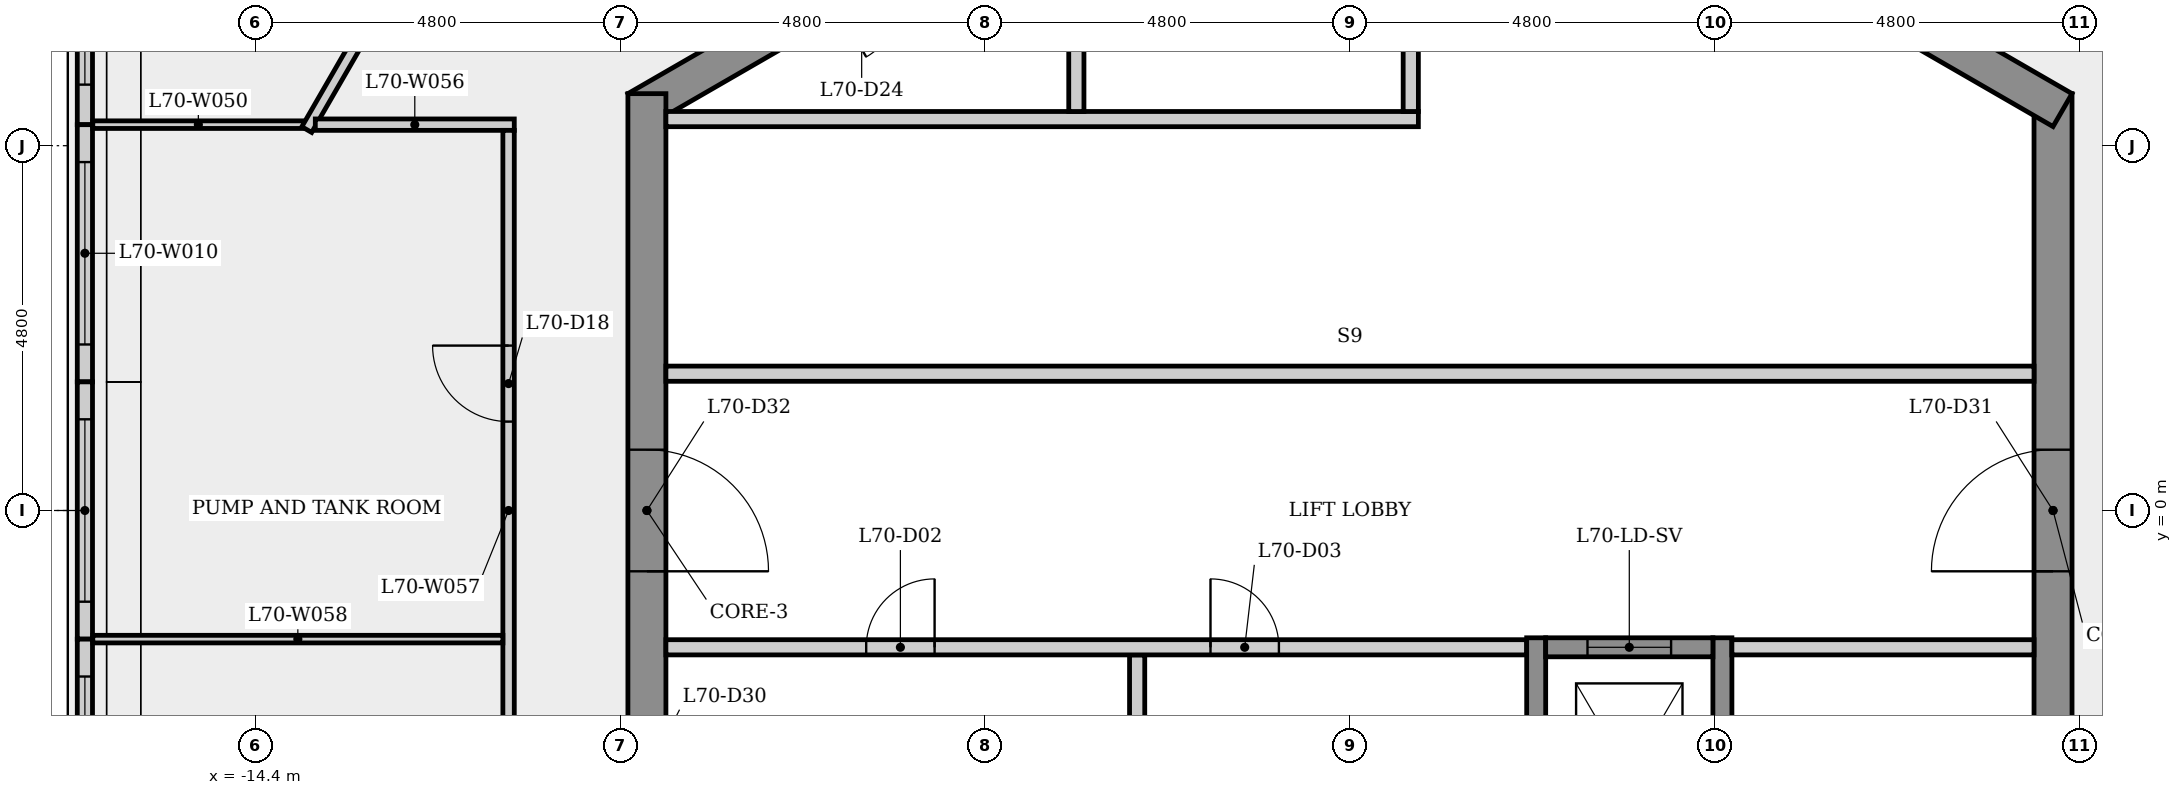
"""IFC4 building model, lengths in metres.
Left out: names, types, materials, properties, quantities, classifications, styles, units other than length and angle.
Written with IfcOpenShell. Run it as: python <this file> out.ifc"""

import sys

from ifc_helpers import new_model, si_unit, direction, frame, frame_2d, origin, place, context, subcontext, project, spatial, rectangle, extrude, element, fill, save


model = new_model("IFC4")
c1 = context("Model", 3, precision=1e-05, world=origin(), true_north=direction((0.0, 1.0)))
c2 = subcontext(c1, "Body", "Model", "MODEL_VIEW")
j1 = project(units=[si_unit("LENGTHUNIT", "METRE"), si_unit("PLANEANGLEUNIT", "RADIAN")], contexts=[c1])
p1 = place(None, origin())
s1 = spatial("IfcSite", under=j1, at=p1, CompositionType="ELEMENT")
p2 = place(p1, origin())
s2 = spatial("IfcBuilding", under=s1, at=p2, CompositionType="ELEMENT")
p3 = place(p2, frame((0.0, 0.0, 262.9)))
s3 = spatial("IfcBuildingStorey", under=s2, at=p3, CompositionType="ELEMENT", Elevation=262.9)
p4 = place(p3, frame((9.25, -5.485, 0.0), z_axis=(0.0, 0.0, 1.0), x_axis=(0.0, 1.0, 0.0)))
e1 = element("IfcWall", 1, at=p4, inside=s3, PredefinedType="SHEAR", context=c2, shape_type="SweptSolid", body=[
    extrude(rectangle(XDim=10.97, YDim=0.5, at=frame_2d((5.485, 0.0))), origin(), (0.0, 0.0, 1.0), 4.8),
])
p5 = place(p4, frame((4.685, 0.0, 0.0)))
e2 = element("IfcOpeningElement", 2, at=p5, cuts=e1, PredefinedType="OPENING", context=c2, shape_type="SweptSolid", body=[
    extrude(rectangle(XDim=1.6, YDim=2.1, at=frame_2d((0.8, 1.05))), frame((0.0, 0.26, 0.0), z_axis=(0.0, -1.0, 0.0), x_axis=(1.0, 0.0, 0.0)), (0.0, 0.0, 1.0), 0.52),
])
p6 = place(p3, frame((9.375, 5.268, 0.0), z_axis=(0.0, 0.0, 1.0), x_axis=(-0.866023993627, 0.500002442456, 0.0)))
e3 = element("IfcWall", 3, at=p6, inside=s3, PredefinedType="SHEAR", context=c2, shape_type="SweptSolid", body=[
    extrude(rectangle(XDim=10.97, YDim=0.5, at=frame_2d((5.485, 0.0))), origin(), (0.0, 0.0, 1.0), 4.8),
])
p7 = place(p6, frame((4.55, 0.0, 0.0)))
e4 = element("IfcOpeningElement", 4, at=p7, cuts=e3, PredefinedType="OPENING", context=c2, shape_type="SweptSolid", body=[
    extrude(rectangle(XDim=0.9, YDim=2.1, at=frame_2d((0.45, 1.05))), frame((0.0, 0.26, 0.0), z_axis=(0.0, -1.0, 0.0), x_axis=(1.0, 0.0, 0.0)), (0.0, 0.0, 1.0), 0.52),
])
p8 = place(p3, frame((0.125, 10.753, 0.0), z_axis=(0.0, 0.0, 1.0), x_axis=(-0.866023993627, -0.500002442456, 0.0)))
e5 = element("IfcWall", 5, at=p8, inside=s3, PredefinedType="SHEAR", context=c2, shape_type="SweptSolid", body=[
    extrude(rectangle(XDim=10.97, YDim=0.5, at=frame_2d((5.485, 0.0))), origin(), (0.0, 0.0, 1.0), 4.8),
])
p9 = place(p8, frame((7.113, 0.0, 0.0)))
e6 = element("IfcOpeningElement", 6, at=p9, cuts=e5, PredefinedType="OPENING", context=c2, shape_type="SweptSolid", body=[
    extrude(rectangle(XDim=0.9, YDim=2.1, at=frame_2d((0.45, 1.05))), frame((0.0, 0.26, 0.0), z_axis=(0.0, -1.0, 0.0), x_axis=(1.0, 0.0, 0.0)), (0.0, 0.0, 1.0), 0.52),
])
p10 = place(p8, frame((1.918, 0.0, 0.0)))
e7 = element("IfcOpeningElement", 7, at=p10, cuts=e5, PredefinedType="OPENING", context=c2, shape_type="SweptSolid", body=[
    extrude(rectangle(XDim=0.9, YDim=2.1, at=frame_2d((0.45, 1.05))), frame((0.0, 0.26, 0.0), z_axis=(0.0, -1.0, 0.0), x_axis=(1.0, 0.0, 0.0)), (0.0, 0.0, 1.0), 0.52),
])
p11 = place(p3, frame((-9.25, 5.485, 0.0), z_axis=(0.0, 0.0, 1.0), x_axis=(0.0, -1.0, 0.0)))
e8 = element("IfcWall", 8, at=p11, inside=s3, PredefinedType="SHEAR", context=c2, shape_type="SweptSolid", body=[
    extrude(rectangle(XDim=10.97, YDim=0.5, at=frame_2d((5.485, 0.0))), origin(), (0.0, 0.0, 1.0), 4.8),
])
p12 = place(p11, frame((8.509, 0.0, 0.0)))
e9 = element("IfcOpeningElement", 9, at=p12, cuts=e8, PredefinedType="OPENING", context=c2, shape_type="SweptSolid", body=[
    extrude(rectangle(XDim=0.9, YDim=2.1, at=frame_2d((0.45, 1.05))), frame((0.0, 0.26, 0.0), z_axis=(0.0, -1.0, 0.0), x_axis=(1.0, 0.0, 0.0)), (0.0, 0.0, 1.0), 0.52),
])
p13 = place(p11, frame((4.685, 0.0, 0.0)))
e10 = element("IfcOpeningElement", 10, at=p13, cuts=e8, PredefinedType="OPENING", context=c2, shape_type="SweptSolid", body=[
    extrude(rectangle(XDim=1.6, YDim=2.1, at=frame_2d((0.8, 1.05))), frame((0.0, 0.26, 0.0), z_axis=(0.0, -1.0, 0.0), x_axis=(1.0, 0.0, 0.0)), (0.0, 0.0, 1.0), 0.52),
])
p14 = place(p3, frame((-16.645, 8.531, 0.0), z_axis=(0.0, 0.0, 1.0), x_axis=(0.0, -1.0, 0.0)))
e11 = element("IfcWall", 11, at=p14, inside=s3, PredefinedType="SOLIDWALL", context=c2, shape_type="SweptSolid", body=[
    extrude(rectangle(XDim=3.454, YDim=0.2, at=frame_2d((1.727, 0.0))), origin(), (0.0, 0.0, 1.0), 4.8),
])
p15 = place(p14, frame((0.527, 0.0, 0.8)))
e12 = element("IfcOpeningElement", 12, at=p15, cuts=e11, PredefinedType="OPENING", context=c2, shape_type="SweptSolid", body=[
    extrude(rectangle(XDim=2.4, YDim=2.4, at=frame_2d((1.2, 1.2))), frame((0.0, 0.11, 0.0), z_axis=(0.0, -1.0, 0.0), x_axis=(1.0, 0.0, 0.0)), (0.0, 0.0, 1.0), 0.22),
])
p16 = place(p3, frame((-16.645, 5.076, 0.0), z_axis=(0.0, 0.0, 1.0), x_axis=(0.0, -1.0, 0.0)))
e13 = element("IfcWall", 13, at=p16, inside=s3, PredefinedType="SOLIDWALL", context=c2, shape_type="SweptSolid", body=[
    extrude(rectangle(XDim=3.384, YDim=0.2, at=frame_2d((1.692, 0.0))), origin(), (0.0, 0.0, 1.0), 4.8),
])
p17 = place(p16, frame((0.492, 0.0, 0.8)))
e14 = element("IfcOpeningElement", 14, at=p17, cuts=e13, PredefinedType="OPENING", context=c2, shape_type="SweptSolid", body=[
    extrude(rectangle(XDim=2.4, YDim=2.4, at=frame_2d((1.2, 1.2))), frame((0.0, 0.11, 0.0), z_axis=(0.0, -1.0, 0.0), x_axis=(1.0, 0.0, 0.0)), (0.0, 0.0, 1.0), 0.22),
])
p18 = place(p3, frame((-16.645, 1.692, 0.0), z_axis=(0.0, 0.0, 1.0), x_axis=(0.0, -1.0, 0.0)))
e15 = element("IfcWall", 15, at=p18, inside=s3, PredefinedType="SOLIDWALL", context=c2, shape_type="SweptSolid", body=[
    extrude(rectangle(XDim=3.385, YDim=0.2, at=frame_2d((1.692, 0.0))), origin(), (0.0, 0.0, 1.0), 4.8),
])
p19 = place(p18, frame((0.492, 0.0, 0.8)))
e16 = element("IfcOpeningElement", 16, at=p19, cuts=e15, PredefinedType="OPENING", context=c2, shape_type="SweptSolid", body=[
    extrude(rectangle(XDim=2.4, YDim=2.4, at=frame_2d((1.2, 1.2))), frame((0.0, 0.11, 0.0), z_axis=(0.0, -1.0, 0.0), x_axis=(1.0, 0.0, 0.0)), (0.0, 0.0, 1.0), 0.22),
])
p20 = place(p3, frame((-16.645, -1.693, 0.0), z_axis=(0.0, 0.0, 1.0), x_axis=(0.0, -1.0, 0.0)))
e17 = element("IfcWall", 17, at=p20, inside=s3, PredefinedType="SOLIDWALL", context=c2, shape_type="SweptSolid", body=[
    extrude(rectangle(XDim=3.384, YDim=0.2, at=frame_2d((1.692, 0.0))), origin(), (0.0, 0.0, 1.0), 4.8),
])
p21 = place(p20, frame((0.492, 0.0, 0.8)))
e18 = element("IfcOpeningElement", 18, at=p21, cuts=e17, PredefinedType="OPENING", context=c2, shape_type="SweptSolid", body=[
    extrude(rectangle(XDim=2.4, YDim=2.4, at=frame_2d((1.2, 1.2))), frame((0.0, 0.11, 0.0), z_axis=(0.0, -1.0, 0.0), x_axis=(1.0, 0.0, 0.0)), (0.0, 0.0, 1.0), 0.22),
])
p22 = place(p3, frame((-16.541, 5.077, 0.0), z_axis=(0.0, 0.0, 1.0), x_axis=(1.0, 0.0, 0.0)))
e19 = element("IfcWall", 19, at=p22, inside=s3, PredefinedType="PARTITIONING", context=c2, shape_type="SweptSolid", body=[
    extrude(rectangle(XDim=2.778, YDim=0.1, at=frame_2d((1.389, 0.0))), origin(), (0.0, 0.0, 1.0), 4.5),
])
p23 = place(p3, frame((-13.725, 5.012, 0.0), z_axis=(0.0, 0.0, 1.0), x_axis=(0.500016458012, 0.866015901539, 0.0)))
e20 = element("IfcWall", 20, at=p23, inside=s3, PredefinedType="PARTITIONING", context=c2, shape_type="SweptSolid", body=[
    extrude(rectangle(XDim=5.966, YDim=0.15, at=frame_2d((2.983, 0.0))), origin(), (0.0, 0.0, 1.0), 4.5),
])
p24 = place(p23, frame((2.483, 0.0, 0.0)))
e21 = element("IfcOpeningElement", 21, at=p24, cuts=e20, PredefinedType="OPENING", context=c2, shape_type="SweptSolid", body=[
    extrude(rectangle(XDim=1.0, YDim=2.1, at=frame_2d((0.5, 1.05))), frame((0.0, 0.085, 0.0), z_axis=(0.0, -1.0, 0.0), x_axis=(1.0, 0.0, 0.0)), (0.0, 0.0, 1.0), 0.17),
])
p25 = place(p3, frame((-10.995, 5.077, 0.0), z_axis=(0.0, 0.0, 1.0), x_axis=(-1.0, 0.0, 0.0)))
e22 = element("IfcWall", 22, at=p25, inside=s3, PredefinedType="PARTITIONING", context=c2, shape_type="SweptSolid", body=[
    extrude(rectangle(XDim=2.618, YDim=0.15, at=frame_2d((1.309, 0.0))), origin(), (0.0, 0.0, 1.0), 4.5),
])
p26 = place(p3, frame((-11.07, -5.002, 0.0), z_axis=(0.0, 0.0, 1.0), x_axis=(0.0, 1.0, 0.0)))
e23 = element("IfcWall", 23, at=p26, inside=s3, PredefinedType="PARTITIONING", context=c2, shape_type="SweptSolid", body=[
    extrude(rectangle(XDim=10.003, YDim=0.15, at=frame_2d((5.002, 0.0))), origin(), (0.0, 0.0, 1.0), 4.5),
])
p27 = place(p26, frame((6.172, 0.0, 0.0)))
e24 = element("IfcOpeningElement", 24, at=p27, cuts=e23, PredefinedType="OPENING", context=c2, shape_type="SweptSolid", body=[
    extrude(rectangle(XDim=1.0, YDim=2.1, at=frame_2d((0.5, 1.05))), frame((0.0, 0.085, 0.0), z_axis=(0.0, -1.0, 0.0), x_axis=(1.0, 0.0, 0.0)), (0.0, 0.0, 1.0), 0.17),
])
p28 = place(p3, frame((-11.145, -1.692, 0.0), z_axis=(0.0, 0.0, 1.0), x_axis=(-1.0, 0.0, 0.0)))
e25 = element("IfcWall", 25, at=p28, inside=s3, PredefinedType="PARTITIONING", context=c2, shape_type="SweptSolid", body=[
    extrude(rectangle(XDim=5.396, YDim=0.1, at=frame_2d((2.698, 0.0))), origin(), (0.0, 0.0, 1.0), 4.5),
])
p29 = place(p3, frame((-9.0, 1.8, 0.0), z_axis=(0.0, 0.0, 1.0), x_axis=(1.0, 0.0, 0.0)))
e26 = element("IfcWall", 26, at=p29, inside=s3, PredefinedType="PARTITIONING", context=c2, shape_type="SweptSolid", body=[
    extrude(rectangle(XDim=18.0, YDim=0.2, at=frame_2d((9.0, 0.0))), origin(), (0.0, 0.0, 1.0), 4.5),
])
p30 = place(p3, frame((-9.0, 5.15, 0.0), z_axis=(0.0, 0.0, 1.0), x_axis=(1.0, 0.0, 0.0)))
e27 = element("IfcWall", 27, at=p30, inside=s3, PredefinedType="PARTITIONING", context=c2, shape_type="SweptSolid", body=[
    extrude(rectangle(XDim=9.9, YDim=0.2, at=frame_2d((4.95, 0.0))), origin(), (0.0, 0.0, 1.0), 4.5),
])
p31 = place(p3, frame((-3.6, 8.314, 0.0), z_axis=(0.0, 0.0, 1.0), x_axis=(0.0, -1.0, 0.0)))
e28 = element("IfcWall", 28, at=p31, inside=s3, PredefinedType="PARTITIONING", context=c2, shape_type="SweptSolid", body=[
    extrude(rectangle(XDim=3.064, YDim=0.2, at=frame_2d((1.532, 0.0))), origin(), (0.0, 0.0, 1.0), 4.5),
])
p32 = place(p3, frame((-2.8, -1.9, 0.0), z_axis=(0.0, 0.0, 1.0), x_axis=(0.0, -1.0, 0.0)))
e29 = element("IfcWall", 29, at=p32, inside=s3, PredefinedType="PARTITIONING", context=c2, shape_type="SweptSolid", body=[
    extrude(rectangle(XDim=3.15, YDim=0.2, at=frame_2d((1.575, 0.0))), origin(), (0.0, 0.0, 1.0), 4.5),
])
p33 = place(p3, frame((-9.0, -1.8, 0.0), z_axis=(0.0, 0.0, 1.0), x_axis=(1.0, 0.0, 0.0)))
e30 = element("IfcWall", 30, at=p33, inside=s3, PredefinedType="PARTITIONING", context=c2, shape_type="SweptSolid", body=[
    extrude(rectangle(XDim=11.325, YDim=0.2, at=frame_2d((5.663, 0.0))), origin(), (0.0, 0.0, 1.0), 4.5),
])
p34 = place(p33, frame((2.635, 0.0, 0.0)))
e31 = element("IfcOpeningElement", 31, at=p34, cuts=e30, PredefinedType="OPENING", context=c2, shape_type="SweptSolid", body=[
    extrude(rectangle(XDim=0.9, YDim=2.1, at=frame_2d((0.45, 1.05))), frame((0.0, 0.11, 0.0), z_axis=(0.0, -1.0, 0.0), x_axis=(1.0, 0.0, 0.0)), (0.0, 0.0, 1.0), 0.22),
])
p35 = place(p33, frame((7.165, 0.0, 0.0)))
e32 = element("IfcOpeningElement", 32, at=p35, cuts=e30, PredefinedType="OPENING", context=c2, shape_type="SweptSolid", body=[
    extrude(rectangle(XDim=0.9, YDim=2.1, at=frame_2d((0.45, 1.05))), frame((0.0, 0.11, 0.0), z_axis=(0.0, -1.0, 0.0), x_axis=(1.0, 0.0, 0.0)), (0.0, 0.0, 1.0), 0.22),
])
p36 = place(p3, frame((0.8, 9.93, 0.0), z_axis=(0.0, 0.0, 1.0), x_axis=(0.0, -1.0, 0.0)))
e33 = element("IfcWall", 33, at=p36, inside=s3, PredefinedType="PARTITIONING", context=c2, shape_type="SweptSolid", body=[
    extrude(rectangle(XDim=4.68, YDim=0.2, at=frame_2d((2.34, 0.0))), origin(), (0.0, 0.0, 1.0), 4.5),
])
p37 = place(p3, frame((2.45, -5.275, 0.0), z_axis=(0.0, 0.0, 1.0), x_axis=(0.0, 1.0, 0.0)))
e34 = element("IfcWall", 34, at=p37, inside=s3, PredefinedType="SHEAR", context=c2, shape_type="SweptSolid", body=[
    extrude(rectangle(XDim=3.6, YDim=0.25, at=frame_2d((1.8, 0.0))), origin(), (0.0, 0.0, 1.0), 4.5),
])
p38 = place(p3, frame((4.9, -1.675, 0.0), z_axis=(0.0, 0.0, 1.0), x_axis=(0.0, -1.0, 0.0)))
e35 = element("IfcWall", 35, at=p38, inside=s3, PredefinedType="SHEAR", context=c2, shape_type="SweptSolid", body=[
    extrude(rectangle(XDim=3.35, YDim=0.25, at=frame_2d((1.675, 0.0))), origin(), (0.0, 0.0, 1.0), 4.5),
])
p39 = place(p3, frame((4.775, -1.8, 0.0), z_axis=(0.0, 0.0, 1.0), x_axis=(-1.0, 0.0, 0.0)))
e36 = element("IfcWall", 36, at=p39, inside=s3, PredefinedType="SHEAR", context=c2, shape_type="SweptSolid", body=[
    extrude(rectangle(XDim=2.2, YDim=0.25, at=frame_2d((1.1, 0.0))), origin(), (0.0, 0.0, 1.0), 4.5),
])
p40 = place(p39, frame((0.55, 0.0, 0.0)))
e37 = element("IfcOpeningElement", 37, at=p40, cuts=e36, PredefinedType="OPENING", context=c2, shape_type="SweptSolid", body=[
    extrude(rectangle(XDim=1.1, YDim=2.1, at=frame_2d((0.55, 1.05))), frame((0.0, 0.135, 0.0), z_axis=(0.0, -1.0, 0.0), x_axis=(1.0, 0.0, 0.0)), (0.0, 0.0, 1.0), 0.27),
])
p41 = place(p3, frame((9.0, -1.8, 0.0), z_axis=(0.0, 0.0, 1.0), x_axis=(-1.0, 0.0, 0.0)))
e38 = element("IfcWall", 38, at=p41, inside=s3, PredefinedType="PARTITIONING", context=c2, shape_type="SweptSolid", body=[
    extrude(rectangle(XDim=3.975, YDim=0.2, at=frame_2d((1.988, 0.0))), origin(), (0.0, 0.0, 1.0), 4.5),
])
p42 = place(p15, origin())
e39 = element("IfcWindow", 39, at=p42, inside=s3, PartitioningType="SINGLE_PANEL", PredefinedType="WINDOW", context=c2, shape_type="SweptSolid", body=[
    extrude(rectangle(XDim=2.4, YDim=2.4, at=frame_2d((1.2, 1.2))), frame((0.0, 0.03, 0.0), z_axis=(0.0, -1.0, 0.0), x_axis=(1.0, 0.0, 0.0)), (0.0, 0.0, 1.0), 0.06),
])
fill(e12, e39)
p43 = place(p17, origin())
e40 = element("IfcWindow", 40, at=p43, inside=s3, PartitioningType="SINGLE_PANEL", PredefinedType="WINDOW", context=c2, shape_type="SweptSolid", body=[
    extrude(rectangle(XDim=2.4, YDim=2.4, at=frame_2d((1.2, 1.2))), frame((0.0, 0.03, 0.0), z_axis=(0.0, -1.0, 0.0), x_axis=(1.0, 0.0, 0.0)), (0.0, 0.0, 1.0), 0.06),
])
fill(e14, e40)
p44 = place(p19, origin())
e41 = element("IfcWindow", 41, at=p44, inside=s3, PartitioningType="SINGLE_PANEL", PredefinedType="WINDOW", context=c2, shape_type="SweptSolid", body=[
    extrude(rectangle(XDim=2.4, YDim=2.4, at=frame_2d((1.2, 1.2))), frame((0.0, 0.03, 0.0), z_axis=(0.0, -1.0, 0.0), x_axis=(1.0, 0.0, 0.0)), (0.0, 0.0, 1.0), 0.06),
])
fill(e16, e41)
p45 = place(p21, origin())
e42 = element("IfcWindow", 42, at=p45, inside=s3, PartitioningType="SINGLE_PANEL", PredefinedType="WINDOW", context=c2, shape_type="SweptSolid", body=[
    extrude(rectangle(XDim=2.4, YDim=2.4, at=frame_2d((1.2, 1.2))), frame((0.0, 0.03, 0.0), z_axis=(0.0, -1.0, 0.0), x_axis=(1.0, 0.0, 0.0)), (0.0, 0.0, 1.0), 0.06),
])
fill(e18, e42)
p46 = place(p40, origin())
e43 = element("IfcDoor", 43, at=p46, inside=s3, OperationType="SLIDING_TO_LEFT", PredefinedType="DOOR", context=c2, shape_type="SweptSolid", body=[
    extrude(rectangle(XDim=1.1, YDim=2.1, at=frame_2d((0.55, 1.05))), frame((0.0, 0.025, 0.0), z_axis=(0.0, -1.0, 0.0), x_axis=(1.0, 0.0, 0.0)), (0.0, 0.0, 1.0), 0.05),
])
fill(e37, e43)
p47 = place(p34, origin())
e44 = element("IfcDoor", 44, at=p47, inside=s3, OperationType="SINGLE_SWING_RIGHT", PredefinedType="DOOR", context=c2, shape_type="SweptSolid", body=[
    extrude(rectangle(XDim=0.9, YDim=2.1, at=frame_2d((0.45, 1.05))), frame((0.0, 0.025, 0.0), z_axis=(0.0, -1.0, 0.0), x_axis=(1.0, 0.0, 0.0)), (0.0, 0.0, 1.0), 0.05),
])
fill(e31, e44)
p48 = place(p35, origin())
e45 = element("IfcDoor", 45, at=p48, inside=s3, OperationType="SINGLE_SWING_LEFT", PredefinedType="DOOR", context=c2, shape_type="SweptSolid", body=[
    extrude(rectangle(XDim=0.9, YDim=2.1, at=frame_2d((0.45, 1.05))), frame((0.0, 0.025, 0.0), z_axis=(0.0, -1.0, 0.0), x_axis=(1.0, 0.0, 0.0)), (0.0, 0.0, 1.0), 0.05),
])
fill(e32, e45)
p49 = place(p27, origin())
e46 = element("IfcDoor", 46, at=p49, inside=s3, OperationType="SINGLE_SWING_RIGHT", PredefinedType="DOOR", context=c2, shape_type="SweptSolid", body=[
    extrude(rectangle(XDim=1.0, YDim=2.1, at=frame_2d((0.5, 1.05))), frame((0.0, 0.025, 0.0), z_axis=(0.0, -1.0, 0.0), x_axis=(1.0, 0.0, 0.0)), (0.0, 0.0, 1.0), 0.05),
])
fill(e24, e46)
p50 = place(p5, origin())
e47 = element("IfcDoor", 47, at=p50, inside=s3, OperationType="SINGLE_SWING_LEFT", PredefinedType="DOOR", context=c2, shape_type="SweptSolid", body=[
    extrude(rectangle(XDim=1.6, YDim=2.1, at=frame_2d((0.8, 1.05))), frame((0.0, 0.025, 0.0), z_axis=(0.0, -1.0, 0.0), x_axis=(1.0, 0.0, 0.0)), (0.0, 0.0, 1.0), 0.05),
])
fill(e2, e47)
p51 = place(p13, origin())
e48 = element("IfcDoor", 48, at=p51, inside=s3, OperationType="SINGLE_SWING_RIGHT", PredefinedType="DOOR", context=c2, shape_type="SweptSolid", body=[
    extrude(rectangle(XDim=1.6, YDim=2.1, at=frame_2d((0.8, 1.05))), frame((0.0, 0.025, 0.0), z_axis=(0.0, -1.0, 0.0), x_axis=(1.0, 0.0, 0.0)), (0.0, 0.0, 1.0), 0.05),
])
fill(e10, e48)
save(model, sys.argv[1])
